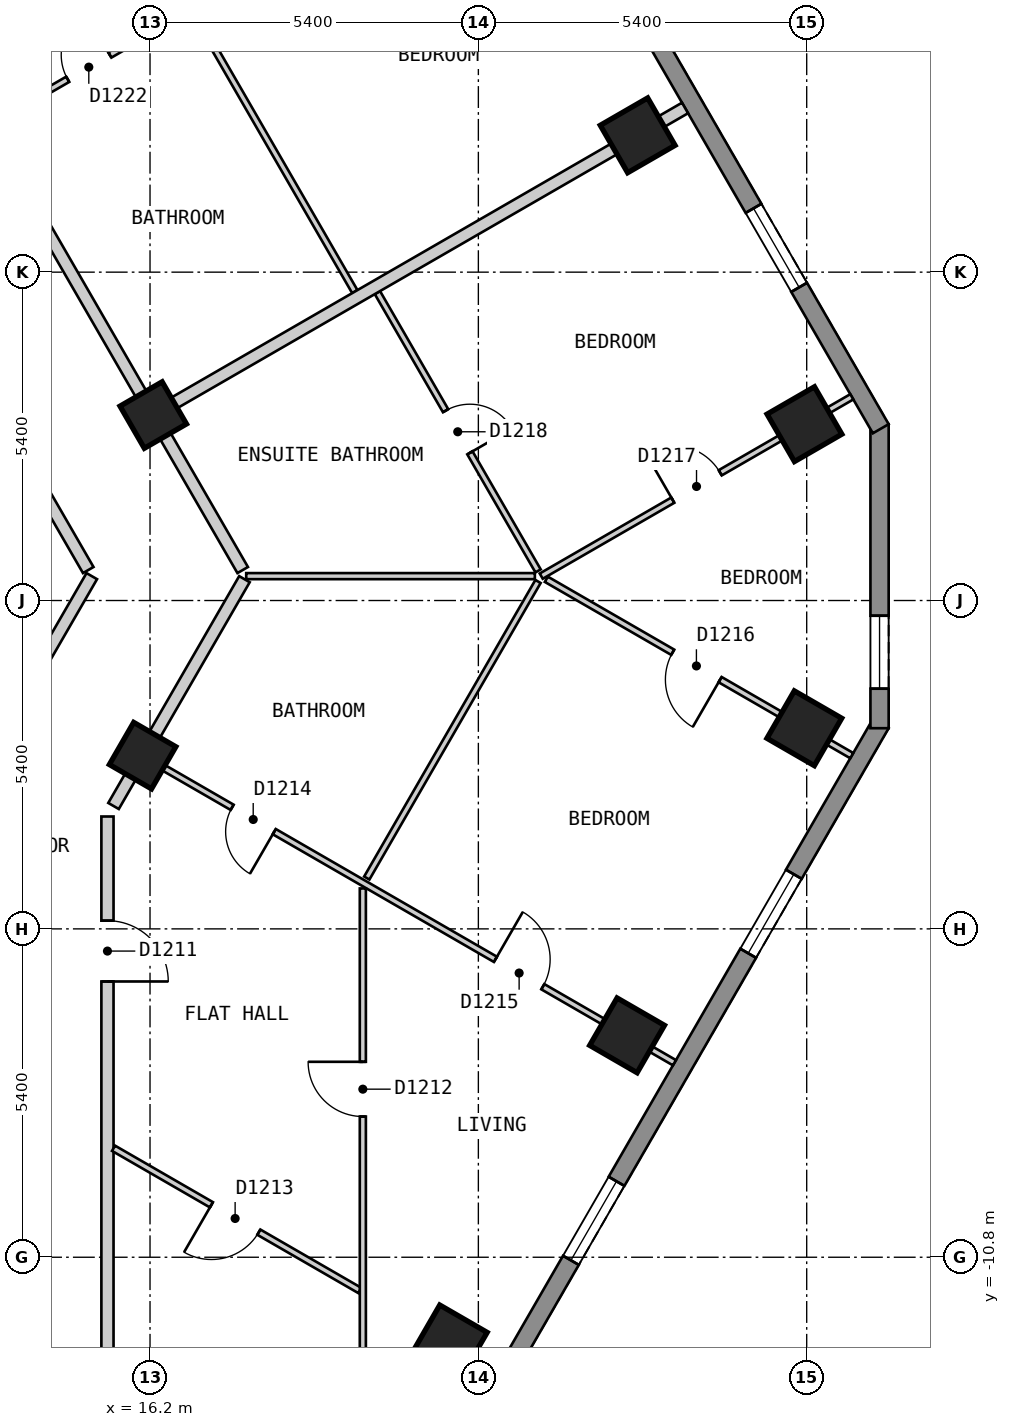
"""IFC4 building model, lengths in metres.
Left out: names, types, materials, properties, quantities, classifications, styles, units other than length and angle.
Written with IfcOpenShell. Run it as: python <this file> out.ifc"""

import sys

from ifc_helpers import new_model, si_unit, direction, frame, frame_2d, origin, origin_2d, place, context, subcontext, project, spatial, polyline, rectangle, outline, extrude, element, fill, save


model = new_model("IFC4")
c1 = context("Model", 3, precision=1e-05, world=origin(), true_north=direction((0.0, 1.0)))
c2 = subcontext(c1, "Body", "Model", "MODEL_VIEW")
j1 = project(units=[si_unit("LENGTHUNIT", "METRE"), si_unit("PLANEANGLEUNIT", "RADIAN")], contexts=[c1])
p1 = place(None, origin())
s1 = spatial("IfcSite", under=j1, at=p1, CompositionType="ELEMENT")
p2 = place(p1, origin())
s2 = spatial("IfcBuilding", under=s1, at=p2, CompositionType="ELEMENT")
p3 = place(p2, frame((0.0, 0.0, 117.6)))
s3 = spatial("IfcBuildingStorey", under=s2, at=p3, CompositionType="ELEMENT", Elevation=117.6)
for number, where, z_axis, x_axis in (
    (1, (21.13, -12.201, 0.0), (0.0, 0.0, 1.0), (0.5, 0.866, 0.0)),
    (2, (24.046, -7.151, 0.0), (0.0, 0.0, 1.0), (0.5, 0.866, 0.0)),
    (3, (26.961, -2.101, 0.0), (0.0, 0.0, 1.0), (0.5, 0.866, 0.0)),
    (4, (26.963, 2.9, 0.0), (0.0, 0.0, 1.0), (-0.5, 0.866, 0.0)),
    (5, (24.22, 7.65, 0.0), (0.0, 0.0, 1.0), (-0.5, 0.866, 0.0)),
):
    element("IfcColumn", number, at=place(p3, frame(where, z_axis=z_axis, x_axis=x_axis)), inside=s3, PredefinedType="COLUMN", context=c2, shape_type="SweptSolid", body=[
        extrude(rectangle(XDim=0.9, YDim=0.9, at=origin_2d()), origin(), (0.0, 0.0, 1.0), 3.0),
    ])
for number, where, z_axis, x_axis in (
    (6, (16.078, -2.551, 0.0), (0.0, 0.0, 1.0), (0.5, 0.866, 0.0)),
    (7, (16.253, 3.05, 0.0), (0.0, 0.0, 1.0), (-0.5, 0.866, 0.0)),
):
    element("IfcColumn", number, at=place(p3, frame(where, z_axis=z_axis, x_axis=x_axis)), inside=s3, PredefinedType="COLUMN", context=c2, shape_type="SweptSolid", body=[
        extrude(rectangle(XDim=0.8, YDim=0.8, at=origin_2d()), origin(), (0.0, 0.0, 1.0), 3.0),
    ])
p4 = place(p3, frame((15.862, -23.425, 0.0), z_axis=(0.0, 0.0, 1.0), x_axis=(0.500017503135, 0.866015298109, 0.0)))
e8 = element("IfcWall", 8, at=p4, inside=s3, PredefinedType="SOLIDWALL", context=c2, shape_type="SweptSolid", body=[
    extrude(outline(polyline([(0.0, -0.15), (24.711, -0.15), (24.631, 0.15), (0.08, 0.15), (0.0, -0.15)])), origin(), (0.0, 0.0, 1.0), 2.7),
])
p5 = place(p4, frame((2.857, 0.0, 0.15)))
e9 = element("IfcOpeningElement", 9, at=p5, cuts=e8, PredefinedType="OPENING", context=c2, shape_type="SweptSolid", body=[
    extrude(rectangle(XDim=1.5, YDim=2.1, at=frame_2d((0.75, 1.05))), frame((0.0, 0.16, 0.0), z_axis=(0.0, -1.0, 0.0), x_axis=(1.0, 0.0, 0.0)), (0.0, 0.0, 1.0), 0.32),
])
p6 = place(p4, frame((8.689, 0.0, 0.15)))
e10 = element("IfcOpeningElement", 10, at=p6, cuts=e8, PredefinedType="OPENING", context=c2, shape_type="SweptSolid", body=[
    extrude(rectangle(XDim=1.5, YDim=2.1, at=frame_2d((0.75, 1.05))), frame((0.0, 0.16, 0.0), z_axis=(0.0, -1.0, 0.0), x_axis=(1.0, 0.0, 0.0)), (0.0, 0.0, 1.0), 0.32),
])
p7 = place(p4, frame((14.52, 0.0, 0.15)))
e11 = element("IfcOpeningElement", 11, at=p7, cuts=e8, PredefinedType="OPENING", context=c2, shape_type="SweptSolid", body=[
    extrude(rectangle(XDim=1.5, YDim=2.1, at=frame_2d((0.75, 1.05))), frame((0.0, 0.16, 0.0), z_axis=(0.0, -1.0, 0.0), x_axis=(1.0, 0.0, 0.0)), (0.0, 0.0, 1.0), 0.32),
])
p8 = place(p4, frame((20.351, 0.0, 0.15)))
e12 = element("IfcOpeningElement", 12, at=p8, cuts=e8, PredefinedType="OPENING", context=c2, shape_type="SweptSolid", body=[
    extrude(rectangle(XDim=1.5, YDim=2.1, at=frame_2d((0.75, 1.05))), frame((0.0, 0.16, 0.0), z_axis=(0.0, -1.0, 0.0), x_axis=(1.0, 0.0, 0.0)), (0.0, 0.0, 1.0), 0.32),
])
p9 = place(p3, frame((28.198, -2.1, 0.0), z_axis=(0.0, 0.0, 1.0), x_axis=(0.0, 1.0, 0.0)))
e13 = element("IfcWall", 13, at=p9, inside=s3, PredefinedType="SOLIDWALL", context=c2, shape_type="SweptSolid", body=[
    extrude(outline(polyline([(0.0, -0.15), (5.0, -0.15), (4.92, 0.15), (0.08, 0.15), (0.0, -0.15)])), origin(), (0.0, 0.0, 1.0), 2.7),
])
p10 = place(p9, frame((0.65, 0.0, 0.15)))
e14 = element("IfcOpeningElement", 14, at=p10, cuts=e13, PredefinedType="OPENING", context=c2, shape_type="SweptSolid", body=[
    extrude(rectangle(XDim=1.2, YDim=2.1, at=frame_2d((0.6, 1.05))), frame((0.0, 0.16, 0.0), z_axis=(0.0, -1.0, 0.0), x_axis=(1.0, 0.0, 0.0)), (0.0, 0.0, 1.0), 0.32),
])
p11 = place(p3, frame((28.218, 2.825, 0.0), z_axis=(0.0, 0.0, 1.0), x_axis=(-0.500020536353, 0.866013546791, 0.0)))
e15 = element("IfcWall", 15, at=p11, inside=s3, PredefinedType="SOLIDWALL", context=c2, shape_type="SweptSolid", body=[
    extrude(outline(polyline([(0.0, -0.15), (23.325, -0.15), (23.245, 0.15), (0.08, 0.15), (0.0, -0.15)])), origin(), (0.0, 0.0, 1.0), 2.7),
])
p12 = place(p11, frame((2.685, 0.0, 0.15)))
e16 = element("IfcOpeningElement", 16, at=p12, cuts=e15, PredefinedType="OPENING", context=c2, shape_type="SweptSolid", body=[
    extrude(rectangle(XDim=1.5, YDim=2.1, at=frame_2d((0.75, 1.05))), frame((0.0, 0.16, 0.0), z_axis=(0.0, -1.0, 0.0), x_axis=(1.0, 0.0, 0.0)), (0.0, 0.0, 1.0), 0.32),
])
p13 = place(p11, frame((8.17, 0.0, 0.15)))
e17 = element("IfcOpeningElement", 17, at=p13, cuts=e15, PredefinedType="OPENING", context=c2, shape_type="SweptSolid", body=[
    extrude(rectangle(XDim=1.5, YDim=2.1, at=frame_2d((0.75, 1.05))), frame((0.0, 0.16, 0.0), z_axis=(0.0, -1.0, 0.0), x_axis=(1.0, 0.0, 0.0)), (0.0, 0.0, 1.0), 0.32),
])
p14 = place(p11, frame((13.655, 0.0, 0.15)))
e18 = element("IfcOpeningElement", 18, at=p14, cuts=e15, PredefinedType="OPENING", context=c2, shape_type="SweptSolid", body=[
    extrude(rectangle(XDim=1.5, YDim=2.1, at=frame_2d((0.75, 1.05))), frame((0.0, 0.16, 0.0), z_axis=(0.0, -1.0, 0.0), x_axis=(1.0, 0.0, 0.0)), (0.0, 0.0, 1.0), 0.32),
])
p15 = place(p11, frame((19.14, 0.0, 0.15)))
e19 = element("IfcOpeningElement", 19, at=p15, cuts=e15, PredefinedType="OPENING", context=c2, shape_type="SweptSolid", body=[
    extrude(rectangle(XDim=1.5, YDim=2.1, at=frame_2d((0.75, 1.05))), frame((0.0, 0.16, 0.0), z_axis=(0.0, -1.0, 0.0), x_axis=(1.0, 0.0, 0.0)), (0.0, 0.0, 1.0), 0.32),
])
p16 = place(p3, frame((7.967, 13.0, 0.0), z_axis=(0.0, 0.0, 1.0), x_axis=(0.50003774998, -0.866003607726, 0.0)))
e20 = element("IfcWall", 20, at=p16, inside=s3, PredefinedType="PARTITIONING", context=c2, shape_type="SweptSolid", body=[
    extrude(rectangle(XDim=14.433, YDim=0.2, at=frame_2d((7.217, 0.0))), origin(), (0.0, 0.0, 1.0), 2.7),
])
p17 = place(p16, frame((6.824, 0.0, 0.0)))
e21 = element("IfcOpeningElement", 21, at=p17, cuts=e20, PredefinedType="OPENING", context=c2, shape_type="SweptSolid", body=[
    extrude(rectangle(XDim=0.9, YDim=2.1, at=frame_2d((0.45, 1.05))), frame((0.0, 0.11, 0.0), z_axis=(0.0, -1.0, 0.0), x_axis=(1.0, 0.0, 0.0)), (0.0, 0.0, 1.0), 0.22),
])
p18 = place(p3, frame((9.296, 15.1, 0.0), z_axis=(0.0, 0.0, 1.0), x_axis=(0.499974024244, -0.866040400375, 0.0)))
e22 = element("IfcWall", 22, at=p18, inside=s3, PredefinedType="PARTITIONING", context=c2, shape_type="SweptSolid", body=[
    extrude(rectangle(XDim=16.857, YDim=0.2, at=frame_2d((8.429, 0.0))), origin(), (0.0, 0.0, 1.0), 2.7),
])
p19 = place(p18, frame((5.187, 0.0, 0.0)))
e23 = element("IfcOpeningElement", 23, at=p19, cuts=e22, PredefinedType="OPENING", context=c2, shape_type="SweptSolid", body=[
    extrude(rectangle(XDim=1.0, YDim=2.1, at=frame_2d((0.5, 1.05))), frame((0.0, 0.11, 0.0), z_axis=(0.0, -1.0, 0.0), x_axis=(1.0, 0.0, 0.0)), (0.0, 0.0, 1.0), 0.22),
])
p20 = place(p3, frame((13.394, -2.8, 0.0), z_axis=(0.0, 0.0, 1.0), x_axis=(0.499968324138, 0.866043691079, 0.0)))
e24 = element("IfcWall", 24, at=p20, inside=s3, PredefinedType="PARTITIONING", context=c2, shape_type="SweptSolid", body=[
    extrude(rectangle(XDim=3.696, YDim=0.2, at=frame_2d((1.848, 0.0))), origin(), (0.0, 0.0, 1.0), 2.7),
])
p21 = place(p3, frame((15.6, -3.379, 0.0), z_axis=(0.0, 0.0, 1.0), x_axis=(0.499882759391, 0.866093082101, 0.0)))
e25 = element("IfcWall", 25, at=p21, inside=s3, PredefinedType="PARTITIONING", context=c2, shape_type="SweptSolid", body=[
    extrude(rectangle(XDim=4.307, YDim=0.2, at=frame_2d((2.153, 0.0))), origin(), (0.0, 0.0, 1.0), 2.7),
])
p22 = place(p3, frame((15.5, -21.199, 0.0), z_axis=(0.0, 0.0, 1.0), x_axis=(0.0, 1.0, 0.0)))
e26 = element("IfcWall", 26, at=p22, inside=s3, PredefinedType="PARTITIONING", context=c2, shape_type="SweptSolid", body=[
    extrude(rectangle(XDim=17.647, YDim=0.2, at=frame_2d((8.823, 0.0))), origin(), (0.0, 0.0, 1.0), 2.7),
])
p23 = place(p22, frame((14.934, 0.0, 0.0)))
e27 = element("IfcOpeningElement", 27, at=p23, cuts=e26, PredefinedType="OPENING", context=c2, shape_type="SweptSolid", body=[
    extrude(rectangle(XDim=1.0, YDim=2.1, at=frame_2d((0.5, 1.05))), frame((0.0, 0.11, 0.0), z_axis=(0.0, -1.0, 0.0), x_axis=(1.0, 0.0, 0.0)), (0.0, 0.0, 1.0), 0.22),
])
p24 = place(p3, frame((11.539, 18.986, 0.0), z_axis=(0.0, 0.0, 1.0), x_axis=(0.500019453803, -0.866014171835, 0.0)))
e28 = element("IfcWall", 28, at=p24, inside=s3, PredefinedType="PARTITIONING", context=c2, shape_type="SweptSolid", body=[
    extrude(rectangle(XDim=16.057, YDim=0.1, at=frame_2d((8.029, 0.0))), origin(), (0.0, 0.0, 1.0), 2.7),
])
p25 = place(p24, frame((7.48, 0.0, 0.0)))
e29 = element("IfcOpeningElement", 29, at=p25, cuts=e28, PredefinedType="OPENING", context=c2, shape_type="SweptSolid", body=[
    extrude(rectangle(XDim=0.9, YDim=2.1, at=frame_2d((0.45, 1.05))), frame((0.0, 0.06, 0.0), z_axis=(0.0, -1.0, 0.0), x_axis=(1.0, 0.0, 0.0)), (0.0, 0.0, 1.0), 0.12),
])
p26 = place(p3, frame((19.94, 5.063, 0.0), z_axis=(0.0, 0.0, 1.0), x_axis=(0.500025085526, -0.866010920165, 0.0)))
e30 = element("IfcWall", 30, at=p26, inside=s3, PredefinedType="PARTITIONING", context=c2, shape_type="SweptSolid", body=[
    extrude(rectangle(XDim=5.284, YDim=0.1, at=frame_2d((2.642, 0.0))), origin(), (0.0, 0.0, 1.0), 2.7),
])
p27 = place(p26, frame((2.242, 0.0, 0.0)))
e31 = element("IfcOpeningElement", 31, at=p27, cuts=e30, PredefinedType="OPENING", context=c2, shape_type="SweptSolid", body=[
    extrude(rectangle(XDim=0.8, YDim=2.1, at=frame_2d((0.4, 1.05))), frame((0.0, 0.06, 0.0), z_axis=(0.0, -1.0, 0.0), x_axis=(1.0, 0.0, 0.0)), (0.0, 0.0, 1.0), 0.12),
])
p28 = place(p3, frame((15.6, -9.008, 0.0), z_axis=(0.0, 0.0, 1.0), x_axis=(0.866049960314, -0.49995746443, 0.0)))
e32 = element("IfcWall", 32, at=p28, inside=s3, PredefinedType="PARTITIONING", context=c2, shape_type="SweptSolid", body=[
    extrude(rectangle(XDim=4.676, YDim=0.1, at=frame_2d((2.338, 0.0))), origin(), (0.0, 0.0, 1.0), 2.7),
])
p29 = place(p28, frame((1.859, 0.0, 0.0)))
e33 = element("IfcOpeningElement", 33, at=p29, cuts=e32, PredefinedType="OPENING", context=c2, shape_type="SweptSolid", body=[
    extrude(rectangle(XDim=0.9, YDim=2.1, at=frame_2d((0.45, 1.05))), frame((0.0, 0.06, 0.0), z_axis=(0.0, -1.0, 0.0), x_axis=(1.0, 0.0, 0.0)), (0.0, 0.0, 1.0), 0.12),
])
p30 = place(p3, frame((16.165, -2.601, 0.0), z_axis=(0.0, 0.0, 1.0), x_axis=(0.866016855193, -0.500014806302, 0.0)))
e34 = element("IfcWall", 34, at=p30, inside=s3, PredefinedType="PARTITIONING", context=c2, shape_type="SweptSolid", body=[
    extrude(rectangle(XDim=10.0, YDim=0.1, at=frame_2d((5.0, 0.0))), origin(), (0.0, 0.0, 1.0), 2.7),
])
p31 = place(p30, frame((1.6, 0.0, 0.0)))
e35 = element("IfcOpeningElement", 35, at=p31, cuts=e34, PredefinedType="OPENING", context=c2, shape_type="SweptSolid", body=[
    extrude(rectangle(XDim=0.8, YDim=2.1, at=frame_2d((0.4, 1.05))), frame((0.0, 0.06, 0.0), z_axis=(0.0, -1.0, 0.0), x_axis=(1.0, 0.0, 0.0)), (0.0, 0.0, 1.0), 0.12),
])
p32 = place(p30, frame((6.6, 0.0, 0.0)))
e36 = element("IfcOpeningElement", 36, at=p32, cuts=e34, PredefinedType="OPENING", context=c2, shape_type="SweptSolid", body=[
    extrude(rectangle(XDim=0.9, YDim=2.1, at=frame_2d((0.45, 1.05))), frame((0.0, 0.06, 0.0), z_axis=(0.0, -1.0, 0.0), x_axis=(1.0, 0.0, 0.0)), (0.0, 0.0, 1.0), 0.12),
])
p33 = place(p3, frame((22.718, 0.349, 0.0), z_axis=(0.0, 0.0, 1.0), x_axis=(0.86601454848, -0.500018801468, 0.0)))
e37 = element("IfcWall", 37, at=p33, inside=s3, PredefinedType="PARTITIONING", context=c2, shape_type="SweptSolid", body=[
    extrude(rectangle(XDim=5.8, YDim=0.1, at=frame_2d((2.9, 0.0))), origin(), (0.0, 0.0, 1.0), 2.7),
])
p34 = place(p33, frame((2.4, 0.0, 0.0)))
e38 = element("IfcOpeningElement", 38, at=p34, cuts=e37, PredefinedType="OPENING", context=c2, shape_type="SweptSolid", body=[
    extrude(rectangle(XDim=0.9, YDim=2.1, at=frame_2d((0.45, 1.05))), frame((0.0, 0.06, 0.0), z_axis=(0.0, -1.0, 0.0), x_axis=(1.0, 0.0, 0.0)), (0.0, 0.0, 1.0), 0.12),
])
p35 = place(p3, frame((17.782, 0.401, 0.0), z_axis=(0.0, 0.0, 1.0), x_axis=(1.0, 0.0, 0.0)))
e39 = element("IfcWall", 39, at=p35, inside=s3, PredefinedType="PARTITIONING", context=c2, shape_type="SweptSolid", body=[
    extrude(rectangle(XDim=4.747, YDim=0.1, at=frame_2d((2.374, 0.0))), origin(), (0.0, 0.0, 1.0), 2.7),
])
p36 = place(p3, frame((19.765, -4.564, 0.0), z_axis=(0.0, 0.0, 1.0), x_axis=(0.500060182325, 0.865990654714, 0.0)))
e40 = element("IfcWall", 40, at=p36, inside=s3, PredefinedType="PARTITIONING", context=c2, shape_type="SweptSolid", body=[
    extrude(rectangle(XDim=5.632, YDim=0.1, at=frame_2d((2.816, 0.0))), origin(), (0.0, 0.0, 1.0), 2.7),
])
p37 = place(p3, frame((19.7, -16.477, 0.0), z_axis=(0.0, 0.0, 1.0), x_axis=(0.0, 1.0, 0.0)))
e41 = element("IfcWall", 41, at=p37, inside=s3, PredefinedType="PARTITIONING", context=c2, shape_type="SweptSolid", body=[
    extrude(rectangle(XDim=11.742, YDim=0.1, at=frame_2d((5.871, 0.0))), origin(), (0.0, 0.0, 1.0), 2.7),
])
p38 = place(p37, frame((7.991, 0.0, 0.0)))
e42 = element("IfcOpeningElement", 42, at=p38, cuts=e41, PredefinedType="OPENING", context=c2, shape_type="SweptSolid", body=[
    extrude(rectangle(XDim=0.9, YDim=2.1, at=frame_2d((0.45, 1.05))), frame((0.0, 0.06, 0.0), z_axis=(0.0, -1.0, 0.0), x_axis=(1.0, 0.0, 0.0)), (0.0, 0.0, 1.0), 0.12),
])
p39 = place(p3, frame((22.634, 0.401, 0.0), z_axis=(0.0, 0.0, 1.0), x_axis=(0.86601325737, 0.500021037617, 0.0)))
e43 = element("IfcWall", 43, at=p39, inside=s3, PredefinedType="PARTITIONING", context=c2, shape_type="SweptSolid", body=[
    extrude(rectangle(XDim=5.898, YDim=0.1, at=frame_2d((2.949, 0.0))), origin(), (0.0, 0.0, 1.0), 2.7),
])
p40 = place(p39, frame((2.499, 0.0, 0.0)))
e44 = element("IfcOpeningElement", 44, at=p40, cuts=e43, PredefinedType="OPENING", context=c2, shape_type="SweptSolid", body=[
    extrude(rectangle(XDim=0.9, YDim=2.1, at=frame_2d((0.45, 1.05))), frame((0.0, 0.06, 0.0), z_axis=(0.0, -1.0, 0.0), x_axis=(1.0, 0.0, 0.0)), (0.0, 0.0, 1.0), 0.12),
])
p41 = place(p3, frame((13.597, 7.85, 0.0), z_axis=(0.0, 0.0, 1.0), x_axis=(0.8660642533, 0.499932704626, 0.0)))
e45 = element("IfcWall", 45, at=p41, inside=s3, PredefinedType="PARTITIONING", context=c2, shape_type="SweptSolid", body=[
    extrude(rectangle(XDim=3.786, YDim=0.1, at=frame_2d((1.893, 0.0))), origin(), (0.0, 0.0, 1.0), 2.7),
])
p42 = place(p41, frame((1.443, 0.0, 0.0)))
e46 = element("IfcOpeningElement", 46, at=p42, cuts=e45, PredefinedType="OPENING", context=c2, shape_type="SweptSolid", body=[
    extrude(rectangle(XDim=0.8, YDim=2.1, at=frame_2d((0.4, 1.05))), frame((0.0, 0.06, 0.0), z_axis=(0.0, -1.0, 0.0), x_axis=(1.0, 0.0, 0.0)), (0.0, 0.0, 1.0), 0.12),
])
p43 = place(p3, frame((16.339, 3.1, 0.0), z_axis=(0.0, 0.0, 1.0), x_axis=(0.866016855193, 0.500014806302, 0.0)))
e47 = element("IfcWall", 47, at=p43, inside=s3, PredefinedType="PARTITIONING", context=c2, shape_type="SweptSolid", body=[
    extrude(rectangle(XDim=10.0, YDim=0.2, at=frame_2d((5.0, 0.0))), origin(), (0.0, 0.0, 1.0), 2.7),
])
p44 = place(p7, origin())
e48 = element("IfcWindow", 48, at=p44, inside=s3, PartitioningType="SINGLE_PANEL", PredefinedType="WINDOW", context=c2, shape_type="SweptSolid", body=[
    extrude(rectangle(XDim=1.5, YDim=2.1, at=frame_2d((0.75, 1.05))), frame((0.0, 0.03, 0.0), z_axis=(0.0, -1.0, 0.0), x_axis=(1.0, 0.0, 0.0)), (0.0, 0.0, 1.0), 0.06),
])
fill(e11, e48)
p45 = place(p8, origin())
e49 = element("IfcWindow", 49, at=p45, inside=s3, PartitioningType="SINGLE_PANEL", PredefinedType="WINDOW", context=c2, shape_type="SweptSolid", body=[
    extrude(rectangle(XDim=1.5, YDim=2.1, at=frame_2d((0.75, 1.05))), frame((0.0, 0.03, 0.0), z_axis=(0.0, -1.0, 0.0), x_axis=(1.0, 0.0, 0.0)), (0.0, 0.0, 1.0), 0.06),
])
fill(e12, e49)
p46 = place(p10, origin())
e50 = element("IfcWindow", 50, at=p46, inside=s3, PartitioningType="SINGLE_PANEL", PredefinedType="WINDOW", context=c2, shape_type="SweptSolid", body=[
    extrude(rectangle(XDim=1.2, YDim=2.1, at=frame_2d((0.6, 1.05))), frame((0.0, 0.03, 0.0), z_axis=(0.0, -1.0, 0.0), x_axis=(1.0, 0.0, 0.0)), (0.0, 0.0, 1.0), 0.06),
])
fill(e14, e50)
p47 = place(p12, origin())
e51 = element("IfcWindow", 51, at=p47, inside=s3, PartitioningType="SINGLE_PANEL", PredefinedType="WINDOW", context=c2, shape_type="SweptSolid", body=[
    extrude(rectangle(XDim=1.5, YDim=2.1, at=frame_2d((0.75, 1.05))), frame((0.0, 0.03, 0.0), z_axis=(0.0, -1.0, 0.0), x_axis=(1.0, 0.0, 0.0)), (0.0, 0.0, 1.0), 0.06),
])
fill(e16, e51)
p48 = place(p23, origin())
e52 = element("IfcDoor", 52, at=p48, inside=s3, OperationType="SINGLE_SWING_LEFT", PredefinedType="DOOR", context=c2, shape_type="SweptSolid", body=[
    extrude(rectangle(XDim=1.0, YDim=2.1, at=frame_2d((0.5, 1.05))), frame((0.0, 0.025, 0.0), z_axis=(0.0, -1.0, 0.0), x_axis=(1.0, 0.0, 0.0)), (0.0, 0.0, 1.0), 0.05),
])
fill(e27, e52)
p49 = place(p38, origin())
e53 = element("IfcDoor", 53, at=p49, inside=s3, OperationType="SINGLE_SWING_RIGHT", PredefinedType="DOOR", context=c2, shape_type="SweptSolid", body=[
    extrude(rectangle(XDim=0.9, YDim=2.1, at=frame_2d((0.45, 1.05))), frame((0.0, 0.025, 0.0), z_axis=(0.0, -1.0, 0.0), x_axis=(1.0, 0.0, 0.0)), (0.0, 0.0, 1.0), 0.05),
])
fill(e42, e53)
p50 = place(p29, origin())
e54 = element("IfcDoor", 54, at=p50, inside=s3, OperationType="SINGLE_SWING_LEFT", PredefinedType="DOOR", context=c2, shape_type="SweptSolid", body=[
    extrude(rectangle(XDim=0.9, YDim=2.1, at=frame_2d((0.45, 1.05))), frame((0.0, 0.025, 0.0), z_axis=(0.0, -1.0, 0.0), x_axis=(1.0, 0.0, 0.0)), (0.0, 0.0, 1.0), 0.05),
])
fill(e33, e54)
p51 = place(p31, origin())
e55 = element("IfcDoor", 55, at=p51, inside=s3, OperationType="SINGLE_SWING_RIGHT", PredefinedType="DOOR", context=c2, shape_type="SweptSolid", body=[
    extrude(rectangle(XDim=0.8, YDim=2.1, at=frame_2d((0.4, 1.05))), frame((0.0, 0.025, 0.0), z_axis=(0.0, -1.0, 0.0), x_axis=(1.0, 0.0, 0.0)), (0.0, 0.0, 1.0), 0.05),
])
fill(e35, e55)
p52 = place(p32, origin())
e56 = element("IfcDoor", 56, at=p52, inside=s3, OperationType="SINGLE_SWING_LEFT", PredefinedType="DOOR", context=c2, shape_type="SweptSolid", body=[
    extrude(rectangle(XDim=0.9, YDim=2.1, at=frame_2d((0.45, 1.05))), frame((0.0, 0.025, 0.0), z_axis=(0.0, -1.0, 0.0), x_axis=(1.0, 0.0, 0.0)), (0.0, 0.0, 1.0), 0.05),
])
fill(e36, e56)
p53 = place(p34, origin())
e57 = element("IfcDoor", 57, at=p53, inside=s3, OperationType="SINGLE_SWING_RIGHT", PredefinedType="DOOR", context=c2, shape_type="SweptSolid", body=[
    extrude(rectangle(XDim=0.9, YDim=2.1, at=frame_2d((0.45, 1.05))), frame((0.0, 0.025, 0.0), z_axis=(0.0, -1.0, 0.0), x_axis=(1.0, 0.0, 0.0)), (0.0, 0.0, 1.0), 0.05),
])
fill(e38, e57)
p54 = place(p40, origin())
e58 = element("IfcDoor", 58, at=p54, inside=s3, OperationType="SINGLE_SWING_LEFT", PredefinedType="DOOR", context=c2, shape_type="SweptSolid", body=[
    extrude(rectangle(XDim=0.9, YDim=2.1, at=frame_2d((0.45, 1.05))), frame((0.0, 0.025, 0.0), z_axis=(0.0, -1.0, 0.0), x_axis=(1.0, 0.0, 0.0)), (0.0, 0.0, 1.0), 0.05),
])
fill(e44, e58)
p55 = place(p27, origin())
e59 = element("IfcDoor", 59, at=p55, inside=s3, OperationType="SINGLE_SWING_RIGHT", PredefinedType="DOOR", context=c2, shape_type="SweptSolid", body=[
    extrude(rectangle(XDim=0.8, YDim=2.1, at=frame_2d((0.4, 1.05))), frame((0.0, 0.025, 0.0), z_axis=(0.0, -1.0, 0.0), x_axis=(1.0, 0.0, 0.0)), (0.0, 0.0, 1.0), 0.05),
])
fill(e31, e59)
p56 = place(p42, origin())
e60 = element("IfcDoor", 60, at=p56, inside=s3, OperationType="SINGLE_SWING_RIGHT", PredefinedType="DOOR", context=c2, shape_type="SweptSolid", body=[
    extrude(rectangle(XDim=0.8, YDim=2.1, at=frame_2d((0.4, 1.05))), frame((0.0, 0.025, 0.0), z_axis=(0.0, -1.0, 0.0), x_axis=(1.0, 0.0, 0.0)), (0.0, 0.0, 1.0), 0.05),
])
fill(e46, e60)
save(model, sys.argv[1])
